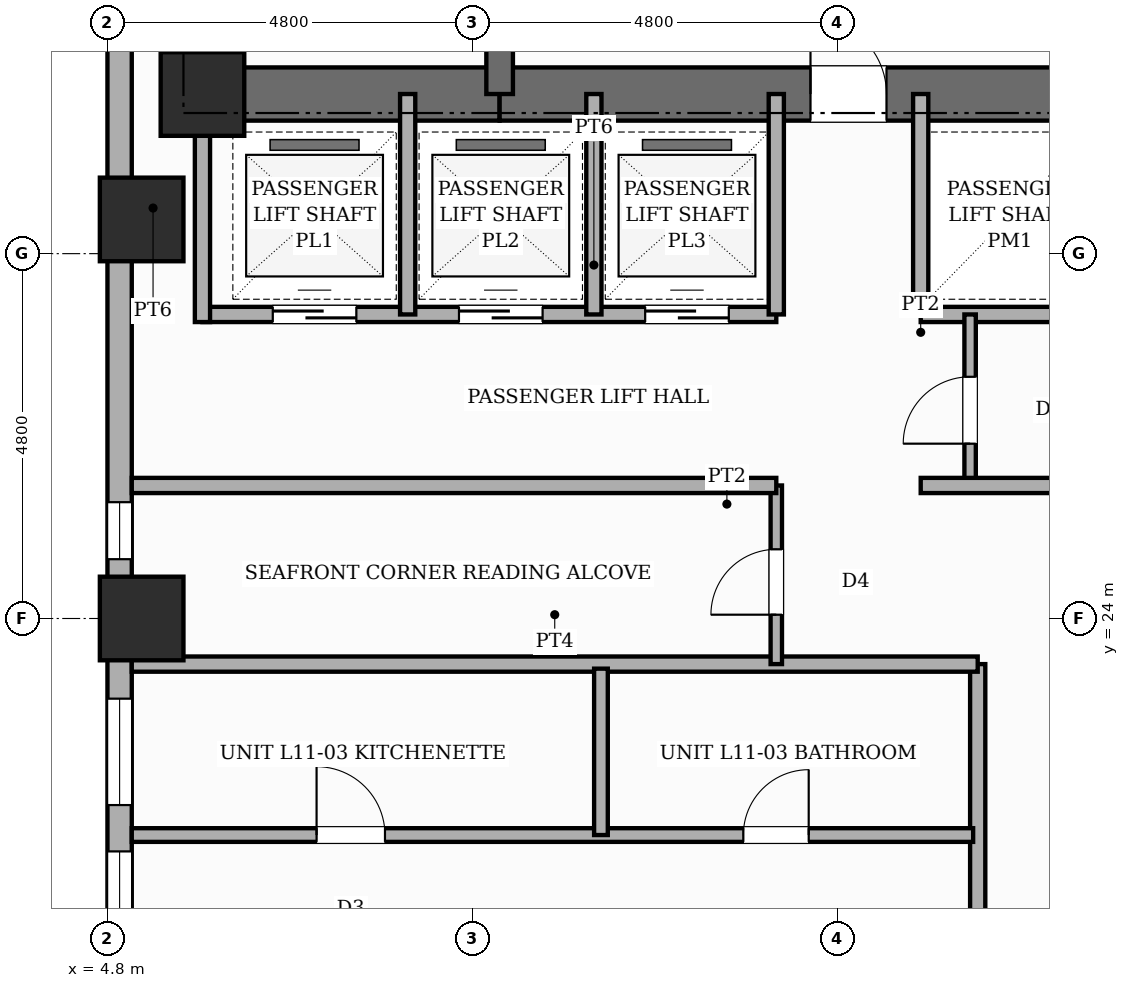
"""IFC4 building model, lengths in metres.
Left out: names, types, materials, properties, quantities, classifications, styles, units other than length and angle.
Written with IfcOpenShell. Run it as: python <this file> out.ifc"""

import sys

from ifc_helpers import new_model, si_unit, direction, frame, frame_2d, origin, origin_2d, place, context, subcontext, project, spatial, rectangle, extrude, element, fill, save


model = new_model("IFC4")
c1 = context("Model", 3, precision=1e-05, world=origin(), true_north=direction((0.0, 1.0)))
c2 = subcontext(c1, "Body", "Model", "MODEL_VIEW")
j1 = project(units=[si_unit("LENGTHUNIT", "METRE"), si_unit("PLANEANGLEUNIT", "RADIAN")], contexts=[c1])
p1 = place(None, origin())
s1 = spatial("IfcSite", under=j1, at=p1, CompositionType="ELEMENT")
p2 = place(p1, origin())
s2 = spatial("IfcBuilding", under=s1, at=p2, CompositionType="ELEMENT")
p3 = place(p2, frame((0.0, 0.0, 46.6)))
s3 = spatial("IfcBuildingStorey", under=s2, at=p3, CompositionType="ELEMENT", Elevation=46.6)
p4 = place(p3, frame((6.05, 30.55, 0.0), z_axis=(0.0, 0.0, 1.0), x_axis=(0.0, 1.0, 0.0)))
e1 = element("IfcWall", 1, at=p4, inside=s3, PredefinedType="SHEAR", context=c2, shape_type="SweptSolid", body=[
    extrude(rectangle(XDim=15.6, YDim=0.7, at=frame_2d((7.8, 0.0))), origin(), (0.0, 0.0, 1.0), 3.6),
])
p5 = place(p3, frame((6.05, 30.9, 0.0), z_axis=(0.0, 0.0, 1.0), x_axis=(1.0, 0.0, 0.0)))
e2 = element("IfcWall", 2, at=p5, inside=s3, PredefinedType="SHEAR", context=c2, shape_type="SweptSolid", body=[
    extrude(rectangle(XDim=3.91, YDim=0.7, at=frame_2d((1.955, 0.0))), origin(), (0.0, 0.0, 1.0), 3.6),
])
p6 = place(p3, frame((9.96, 30.9, 0.0), z_axis=(0.0, 0.0, 1.0), x_axis=(1.0, 0.0, 0.0)))
e3 = element("IfcWall", 3, at=p6, inside=s3, PredefinedType="SHEAR", context=c2, shape_type="SweptSolid", body=[
    extrude(rectangle(XDim=8.88, YDim=0.7, at=frame_2d((4.44, 0.0))), origin(), (0.0, 0.0, 1.0), 3.6),
])
p7 = place(p6, frame((4.09, 0.0, 0.0)))
e4 = element("IfcOpeningElement", 4, at=p7, cuts=e3, PredefinedType="OPENING", context=c2, shape_type="SweptSolid", body=[
    extrude(rectangle(XDim=1.0, YDim=2.15, at=frame_2d((0.5, 1.075))), frame((0.0, 0.36, 0.0), z_axis=(0.0, -1.0, 0.0), x_axis=(1.0, 0.0, 0.0)), (0.0, 0.0, 1.0), 0.72),
])
p8 = place(p3, frame((9.96, 30.9, 0.0), z_axis=(0.0, 0.0, 1.0), x_axis=(0.0, 1.0, 0.0)))
e5 = element("IfcWall", 5, at=p8, inside=s3, PredefinedType="SHEAR", context=c2, shape_type="SweptSolid", body=[
    extrude(rectangle(XDim=14.9, YDim=0.35, at=frame_2d((7.45, 0.0))), origin(), (0.0, 0.0, 1.0), 3.6),
])
p9 = place(p8, frame((0.65, 0.0, 0.0)))
e6 = element("IfcOpeningElement", 6, at=p9, cuts=e5, PredefinedType="OPENING", context=c2, shape_type="SweptSolid", body=[
    extrude(rectangle(XDim=0.95, YDim=2.1, at=frame_2d((0.475, 1.05))), frame((0.0, 0.185, 0.0), z_axis=(0.0, -1.0, 0.0), x_axis=(1.0, 0.0, 0.0)), (0.0, 0.0, 1.0), 0.37),
])
p10 = place(p8, frame((10.45, 0.0, 0.0)))
e7 = element("IfcOpeningElement", 7, at=p10, cuts=e5, PredefinedType="OPENING", context=c2, shape_type="SweptSolid", body=[
    extrude(rectangle(XDim=1.0, YDim=2.15, at=frame_2d((0.5, 1.075))), frame((0.0, 0.185, 0.0), z_axis=(0.0, -1.0, 0.0), x_axis=(1.0, 0.0, 0.0)), (0.0, 0.0, 1.0), 0.37),
])
for number, where, z_axis, x_axis in (
    (8, (5.25, 24.0, 0.0), (0.0, 0.0, 1.0), (1.0, 0.0, 0.0)),
    (9, (5.25, 29.25, 0.0), (0.0, 0.0, 1.0), (1.0, 0.0, 0.0)),
    (10, (6.05, 30.9, 0.0), (0.0, 0.0, 1.0), (1.0, 0.0, 0.0)),
):
    element("IfcColumn", number, at=place(p3, frame(where, z_axis=z_axis, x_axis=x_axis)), inside=s3, PredefinedType="COLUMN", context=c2, shape_type="SweptSolid", body=[
        extrude(rectangle(XDim=1.1, YDim=1.1, at=origin_2d()), origin(), (0.0, 0.0, 1.0), 3.6),
    ])
p11 = place(p3, frame((4.96, 7.2, 0.0), z_axis=(0.0, 0.0, 1.0), x_axis=(0.0, 1.0, 0.0)))
e11 = element("IfcWall", 11, at=p11, inside=s3, PredefinedType="STANDARD", context=c2, shape_type="SweptSolid", body=[
    extrude(rectangle(XDim=38.4, YDim=0.32, at=frame_2d((19.2, 0.0))), origin(), (0.0, 0.0, 1.0), 2.53),
])
p12 = place(p11, frame((9.3, 0.0, 0.0)))
e12 = element("IfcOpeningElement", 12, at=p12, cuts=e11, PredefinedType="OPENING", context=c2, shape_type="SweptSolid", body=[
    extrude(rectangle(XDim=1.1, YDim=2.15, at=frame_2d((0.55, 1.075))), frame((0.0, 0.17, 0.0), z_axis=(0.0, -1.0, 0.0), x_axis=(1.0, 0.0, 0.0)), (0.0, 0.0, 1.0), 0.34),
])
p13 = place(p11, frame((3.97, 0.0, 0.65)))
e13 = element("IfcOpeningElement", 13, at=p13, cuts=e11, PredefinedType="OPENING", context=c2, shape_type="SweptSolid", body=[
    extrude(rectangle(XDim=1.4, YDim=1.1, at=frame_2d((0.7, 0.55))), frame((0.0, 0.17, 0.0), z_axis=(0.0, -1.0, 0.0), x_axis=(1.0, 0.0, 0.0)), (0.0, 0.0, 1.0), 0.34),
])
p14 = place(p11, frame((12.785, 0.0, 0.45)))
e14 = element("IfcOpeningElement", 14, at=p14, cuts=e11, PredefinedType="OPENING", context=c2, shape_type="SweptSolid", body=[
    extrude(rectangle(XDim=0.95, YDim=1.8, at=frame_2d((0.475, 0.9))), frame((0.0, 0.17, 0.0), z_axis=(0.0, -1.0, 0.0), x_axis=(1.0, 0.0, 0.0)), (0.0, 0.0, 1.0), 0.34),
])
p15 = place(p11, frame((0.652, 0.0, 0.45)))
e15 = element("IfcOpeningElement", 15, at=p15, cuts=e11, PredefinedType="OPENING", context=c2, shape_type="SweptSolid", body=[
    extrude(rectangle(XDim=0.95, YDim=1.8, at=frame_2d((0.475, 0.9))), frame((0.0, 0.17, 0.0), z_axis=(0.0, -1.0, 0.0), x_axis=(1.0, 0.0, 0.0)), (0.0, 0.0, 1.0), 0.34),
])
p16 = place(p11, frame((8.01, 0.0, 0.45)))
e16 = element("IfcOpeningElement", 16, at=p16, cuts=e11, PredefinedType="OPENING", context=c2, shape_type="SweptSolid", body=[
    extrude(rectangle(XDim=0.75, YDim=1.8, at=frame_2d((0.375, 0.9))), frame((0.0, 0.17, 0.0), z_axis=(0.0, -1.0, 0.0), x_axis=(1.0, 0.0, 0.0)), (0.0, 0.0, 1.0), 0.34),
])
p17 = place(p11, frame((14.345, 0.0, 0.65)))
e17 = element("IfcOpeningElement", 17, at=p17, cuts=e11, PredefinedType="OPENING", context=c2, shape_type="SweptSolid", body=[
    extrude(rectangle(XDim=1.4, YDim=1.1, at=frame_2d((0.7, 0.55))), frame((0.0, 0.17, 0.0), z_axis=(0.0, -1.0, 0.0), x_axis=(1.0, 0.0, 0.0)), (0.0, 0.0, 1.0), 0.34),
])
p18 = place(p11, frame((17.58, 0.0, 0.45)))
e18 = element("IfcOpeningElement", 18, at=p18, cuts=e11, PredefinedType="OPENING", context=c2, shape_type="SweptSolid", body=[
    extrude(rectangle(XDim=0.75, YDim=1.8, at=frame_2d((0.375, 0.9))), frame((0.0, 0.17, 0.0), z_axis=(0.0, -1.0, 0.0), x_axis=(1.0, 0.0, 0.0)), (0.0, 0.0, 1.0), 0.34),
])
p19 = place(p3, frame((6.05, 28.0, 0.0), z_axis=(0.0, 0.0, 1.0), x_axis=(1.0, 0.0, 0.0)))
e19 = element("IfcWall", 19, at=p19, inside=s3, PredefinedType="POLYGONAL", context=c2, shape_type="SweptSolid", body=[
    extrude(rectangle(XDim=7.55, YDim=0.2, at=frame_2d((3.775, 0.0))), origin(), (0.0, 0.0, 1.0), 3.35),
])
p20 = place(p19, frame((0.925, 0.0, 0.0)))
e20 = element("IfcOpeningElement", 20, at=p20, cuts=e19, PredefinedType="OPENING", context=c2, shape_type="SweptSolid", body=[
    extrude(rectangle(XDim=1.1, YDim=2.15, at=frame_2d((0.55, 1.075))), frame((0.0, 0.11, 0.0), z_axis=(0.0, -1.0, 0.0), x_axis=(1.0, 0.0, 0.0)), (0.0, 0.0, 1.0), 0.22),
])
p21 = place(p19, frame((3.375, 0.0, 0.0)))
e21 = element("IfcOpeningElement", 21, at=p21, cuts=e19, PredefinedType="OPENING", context=c2, shape_type="SweptSolid", body=[
    extrude(rectangle(XDim=1.1, YDim=2.15, at=frame_2d((0.55, 1.075))), frame((0.0, 0.11, 0.0), z_axis=(0.0, -1.0, 0.0), x_axis=(1.0, 0.0, 0.0)), (0.0, 0.0, 1.0), 0.22),
])
p22 = place(p19, frame((5.825, 0.0, 0.0)))
e22 = element("IfcOpeningElement", 22, at=p22, cuts=e19, PredefinedType="OPENING", context=c2, shape_type="SweptSolid", body=[
    extrude(rectangle(XDim=1.1, YDim=2.15, at=frame_2d((0.55, 1.075))), frame((0.0, 0.11, 0.0), z_axis=(0.0, -1.0, 0.0), x_axis=(1.0, 0.0, 0.0)), (0.0, 0.0, 1.0), 0.22),
])
p23 = place(p3, frame((15.5, 28.0, 0.0), z_axis=(0.0, 0.0, 1.0), x_axis=(1.0, 0.0, 0.0)))
e23 = element("IfcWall", 23, at=p23, inside=s3, PredefinedType="POLYGONAL", context=c2, shape_type="SweptSolid", body=[
    extrude(rectangle(XDim=7.25, YDim=0.2, at=frame_2d((3.625, 0.0))), origin(), (0.0, 0.0, 1.0), 3.35),
])
p24 = place(p3, frame((6.05, 27.9, 0.0), z_axis=(0.0, 0.0, 1.0), x_axis=(0.0, 1.0, 0.0)))
e24 = element("IfcWall", 24, at=p24, inside=s3, PredefinedType="POLYGONAL", context=c2, shape_type="SweptSolid", body=[
    extrude(rectangle(XDim=3.0, YDim=0.2, at=frame_2d((1.5, 0.0))), origin(), (0.0, 0.0, 1.0), 3.35),
])
for number, where, z_axis, x_axis in (
    (25, (13.6, 28.0, 0.0), (0.0, 0.0, 1.0), (0.0, 1.0, 0.0)),
    (26, (15.5, 28.0, 0.0), (0.0, 0.0, 1.0), (0.0, 1.0, 0.0)),
    (27, (8.75, 28.0, 0.0), (0.0, 0.0, 1.0), (0.0, 1.0, 0.0)),
    (28, (11.2, 28.0, 0.0), (0.0, 0.0, 1.0), (0.0, 1.0, 0.0)),
):
    element("IfcWall", number, at=place(p3, frame(where, z_axis=z_axis, x_axis=x_axis)), inside=s3, PredefinedType="POLYGONAL", context=c2, shape_type="SweptSolid", body=[
        extrude(rectangle(XDim=2.9, YDim=0.2, at=frame_2d((1.45, 0.0))), origin(), (0.0, 0.0, 1.0), 3.35),
    ])
p25 = place(p3, frame((16.15, 25.75, 0.0), z_axis=(0.0, 0.0, 1.0), x_axis=(0.0, 1.0, 0.0)))
e29 = element("IfcWall", 29, at=p25, inside=s3, PredefinedType="PARTITIONING", context=c2, shape_type="SweptSolid", body=[
    extrude(rectangle(XDim=2.25, YDim=0.15, at=frame_2d((1.125, 0.0))), origin(), (0.0, 0.0, 1.0), 3.35),
])
p26 = place(p25, frame((0.55, 0.0, 0.0)))
e30 = element("IfcOpeningElement", 30, at=p26, cuts=e29, PredefinedType="OPENING", context=c2, shape_type="SweptSolid", body=[
    extrude(rectangle(XDim=0.88, YDim=2.1, at=frame_2d((0.44, 1.05))), frame((0.0, 0.085, 0.0), z_axis=(0.0, -1.0, 0.0), x_axis=(1.0, 0.0, 0.0)), (0.0, 0.0, 1.0), 0.17),
])
p27 = place(p3, frame((16.25, 5.12, 0.0), z_axis=(0.0, 0.0, 1.0), x_axis=(0.0, 1.0, 0.0)))
e31 = element("IfcWall", 31, at=p27, inside=s3, PredefinedType="PARTITIONING", context=c2, shape_type="SweptSolid", body=[
    extrude(rectangle(XDim=18.28, YDim=0.2, at=frame_2d((9.14, 0.0))), origin(), (0.0, 0.0, 1.0), 3.35),
])
p28 = place(p27, frame((1.042, 0.0, 0.0)))
e32 = element("IfcOpeningElement", 32, at=p28, cuts=e31, PredefinedType="OPENING", context=c2, shape_type="SweptSolid", body=[
    extrude(rectangle(XDim=0.98, YDim=2.18, at=frame_2d((0.49, 1.09))), frame((0.0, 0.11, 0.0), z_axis=(0.0, -1.0, 0.0), x_axis=(1.0, 0.0, 0.0)), (0.0, 0.0, 1.0), 0.22),
])
p29 = place(p27, frame((6.28, 0.0, 0.0)))
e33 = element("IfcOpeningElement", 33, at=p29, cuts=e31, PredefinedType="OPENING", context=c2, shape_type="SweptSolid", body=[
    extrude(rectangle(XDim=0.98, YDim=2.18, at=frame_2d((0.49, 1.09))), frame((0.0, 0.11, 0.0), z_axis=(0.0, -1.0, 0.0), x_axis=(1.0, 0.0, 0.0)), (0.0, 0.0, 1.0), 0.22),
])
p30 = place(p27, frame((13.04, 0.0, 0.0)))
e34 = element("IfcOpeningElement", 34, at=p30, cuts=e31, PredefinedType="OPENING", context=c2, shape_type="SweptSolid", body=[
    extrude(rectangle(XDim=0.98, YDim=2.18, at=frame_2d((0.49, 1.09))), frame((0.0, 0.11, 0.0), z_axis=(0.0, -1.0, 0.0), x_axis=(1.0, 0.0, 0.0)), (0.0, 0.0, 1.0), 0.22),
])
p31 = place(p3, frame((5.12, 23.4, 0.0), z_axis=(0.0, 0.0, 1.0), x_axis=(1.0, 0.0, 0.0)))
e35 = element("IfcWall", 35, at=p31, inside=s3, PredefinedType="PARTITIONING", context=c2, shape_type="SweptSolid", body=[
    extrude(rectangle(XDim=11.13, YDim=0.2, at=frame_2d((5.565, 0.0))), origin(), (0.0, 0.0, 1.0), 3.35),
])
p32 = place(p3, frame((15.5, 25.75, 0.0), z_axis=(0.0, 0.0, 1.0), x_axis=(1.0, 0.0, 0.0)))
e36 = element("IfcWall", 36, at=p32, inside=s3, PredefinedType="PARTITIONING", context=c2, shape_type="SweptSolid", body=[
    extrude(rectangle(XDim=8.18, YDim=0.2, at=frame_2d((4.09, 0.0))), origin(), (0.0, 0.0, 1.0), 3.35),
])
p33 = place(p3, frame((13.6, 23.4, 0.0), z_axis=(0.0, 0.0, 1.0), x_axis=(0.0, 1.0, 0.0)))
e37 = element("IfcWall", 37, at=p33, inside=s3, PredefinedType="PARTITIONING", context=c2, shape_type="SweptSolid", body=[
    extrude(rectangle(XDim=2.35, YDim=0.15, at=frame_2d((1.175, 0.0))), origin(), (0.0, 0.0, 1.0), 3.35),
])
p34 = place(p33, frame((0.65, 0.0, 0.0)))
e38 = element("IfcOpeningElement", 38, at=p34, cuts=e37, PredefinedType="OPENING", context=c2, shape_type="SweptSolid", body=[
    extrude(rectangle(XDim=0.86, YDim=2.1, at=frame_2d((0.43, 1.05))), frame((0.0, 0.085, 0.0), z_axis=(0.0, -1.0, 0.0), x_axis=(1.0, 0.0, 0.0)), (0.0, 0.0, 1.0), 0.17),
])
p35 = place(p3, frame((5.12, 25.75, 0.0), z_axis=(0.0, 0.0, 1.0), x_axis=(1.0, 0.0, 0.0)))
e39 = element("IfcWall", 39, at=p35, inside=s3, PredefinedType="PARTITIONING", context=c2, shape_type="SweptSolid", body=[
    extrude(rectangle(XDim=8.48, YDim=0.2, at=frame_2d((4.24, 0.0))), origin(), (0.0, 0.0, 1.0), 3.35),
])
p36 = place(p3, frame((5.12, 21.151, 0.0), z_axis=(0.0, 0.0, 1.0), x_axis=(1.0, 0.0, 0.0)))
e40 = element("IfcWall", 40, at=p36, inside=s3, PredefinedType="PLUMBINGWALL", context=c2, shape_type="SweptSolid", body=[
    extrude(rectangle(XDim=11.07, YDim=0.18, at=frame_2d((5.535, 0.0))), origin(), (0.0, 0.0, 1.0), 3.35),
])
p37 = place(p36, frame((2.431, 0.0, 0.0)))
e41 = element("IfcOpeningElement", 41, at=p37, cuts=e40, PredefinedType="OPENING", context=c2, shape_type="SweptSolid", body=[
    extrude(rectangle(XDim=0.9, YDim=2.15, at=frame_2d((0.45, 1.075))), frame((0.0, 0.1, 0.0), z_axis=(0.0, -1.0, 0.0), x_axis=(1.0, 0.0, 0.0)), (0.0, 0.0, 1.0), 0.2),
])
p38 = place(p36, frame((8.046, 0.0, 0.0)))
e42 = element("IfcOpeningElement", 42, at=p38, cuts=e40, PredefinedType="OPENING", context=c2, shape_type="SweptSolid", body=[
    extrude(rectangle(XDim=0.86, YDim=2.1, at=frame_2d((0.43, 1.05))), frame((0.0, 0.1, 0.0), z_axis=(0.0, -1.0, 0.0), x_axis=(1.0, 0.0, 0.0)), (0.0, 0.0, 1.0), 0.2),
])
p39 = place(p3, frame((11.293, 21.151, 0.0), z_axis=(0.0, 0.0, 1.0), x_axis=(0.0, 1.0, 0.0)))
e43 = element("IfcWall", 43, at=p39, inside=s3, PredefinedType="PLUMBINGWALL", context=c2, shape_type="SweptSolid", body=[
    extrude(rectangle(XDim=2.189, YDim=0.18, at=frame_2d((1.095, 0.0))), origin(), (0.0, 0.0, 1.0), 3.35),
])
p40 = place(p14, origin())
e44 = element("IfcWindow", 44, at=p40, inside=s3, PartitioningType="SINGLE_PANEL", PredefinedType="WINDOW", context=c2, shape_type="SweptSolid", body=[
    extrude(rectangle(XDim=0.95, YDim=1.8, at=frame_2d((0.475, 0.9))), frame((0.0, 0.03, 0.0), z_axis=(0.0, -1.0, 0.0), x_axis=(1.0, 0.0, 0.0)), (0.0, 0.0, 1.0), 0.06),
])
fill(e14, e44)
p41 = place(p17, origin())
e45 = element("IfcWindow", 45, at=p41, inside=s3, PartitioningType="SINGLE_PANEL", PredefinedType="WINDOW", context=c2, shape_type="SweptSolid", body=[
    extrude(rectangle(XDim=1.4, YDim=1.1, at=frame_2d((0.7, 0.55))), frame((0.0, 0.03, 0.0), z_axis=(0.0, -1.0, 0.0), x_axis=(1.0, 0.0, 0.0)), (0.0, 0.0, 1.0), 0.06),
])
fill(e17, e45)
p42 = place(p18, origin())
e46 = element("IfcWindow", 46, at=p42, inside=s3, PartitioningType="SINGLE_PANEL", PredefinedType="WINDOW", context=c2, shape_type="SweptSolid", body=[
    extrude(rectangle(XDim=0.75, YDim=1.8, at=frame_2d((0.375, 0.9))), frame((0.0, 0.03, 0.0), z_axis=(0.0, -1.0, 0.0), x_axis=(1.0, 0.0, 0.0)), (0.0, 0.0, 1.0), 0.06),
])
fill(e18, e46)
p43 = place(p7, origin())
e47 = element("IfcDoor", 47, at=p43, inside=s3, OperationType="SINGLE_SWING_LEFT", PredefinedType="DOOR", context=c2, shape_type="SweptSolid", body=[
    extrude(rectangle(XDim=1.0, YDim=2.15, at=frame_2d((0.5, 1.075))), frame((0.0, 0.025, 0.0), z_axis=(0.0, -1.0, 0.0), x_axis=(1.0, 0.0, 0.0)), (0.0, 0.0, 1.0), 0.05),
])
fill(e4, e47)
p44 = place(p20, origin())
e48 = element("IfcDoor", 48, at=p44, inside=s3, OperationType="SLIDING_TO_LEFT", PredefinedType="DOOR", context=c2, shape_type="SweptSolid", body=[
    extrude(rectangle(XDim=1.1, YDim=2.15, at=frame_2d((0.55, 1.075))), frame((0.0, 0.025, 0.0), z_axis=(0.0, -1.0, 0.0), x_axis=(1.0, 0.0, 0.0)), (0.0, 0.0, 1.0), 0.05),
])
fill(e20, e48)
p45 = place(p21, origin())
e49 = element("IfcDoor", 49, at=p45, inside=s3, OperationType="SLIDING_TO_RIGHT", PredefinedType="DOOR", context=c2, shape_type="SweptSolid", body=[
    extrude(rectangle(XDim=1.1, YDim=2.15, at=frame_2d((0.55, 1.075))), frame((0.0, 0.025, 0.0), z_axis=(0.0, -1.0, 0.0), x_axis=(1.0, 0.0, 0.0)), (0.0, 0.0, 1.0), 0.05),
])
fill(e21, e49)
p46 = place(p22, origin())
e50 = element("IfcDoor", 50, at=p46, inside=s3, OperationType="SLIDING_TO_LEFT", PredefinedType="DOOR", context=c2, shape_type="SweptSolid", body=[
    extrude(rectangle(XDim=1.1, YDim=2.15, at=frame_2d((0.55, 1.075))), frame((0.0, 0.025, 0.0), z_axis=(0.0, -1.0, 0.0), x_axis=(1.0, 0.0, 0.0)), (0.0, 0.0, 1.0), 0.05),
])
fill(e22, e50)
p47 = place(p26, origin())
e51 = element("IfcDoor", 51, at=p47, inside=s3, OperationType="SINGLE_SWING_LEFT", PredefinedType="DOOR", context=c2, shape_type="SweptSolid", body=[
    extrude(rectangle(XDim=0.88, YDim=2.1, at=frame_2d((0.44, 1.05))), frame((0.0, 0.025, 0.0), z_axis=(0.0, -1.0, 0.0), x_axis=(1.0, 0.0, 0.0)), (0.0, 0.0, 1.0), 0.05),
])
fill(e30, e51)
p48 = place(p34, origin())
e52 = element("IfcDoor", 52, at=p48, inside=s3, OperationType="SINGLE_SWING_LEFT", PredefinedType="DOOR", context=c2, shape_type="SweptSolid", body=[
    extrude(rectangle(XDim=0.86, YDim=2.1, at=frame_2d((0.43, 1.05))), frame((0.0, 0.025, 0.0), z_axis=(0.0, -1.0, 0.0), x_axis=(1.0, 0.0, 0.0)), (0.0, 0.0, 1.0), 0.05),
])
fill(e38, e52)
p49 = place(p37, origin())
e53 = element("IfcDoor", 53, at=p49, inside=s3, OperationType="SINGLE_SWING_LEFT", PredefinedType="DOOR", context=c2, shape_type="SweptSolid", body=[
    extrude(rectangle(XDim=0.9, YDim=2.15, at=frame_2d((0.45, 1.075))), frame((0.0, 0.025, 0.0), z_axis=(0.0, -1.0, 0.0), x_axis=(1.0, 0.0, 0.0)), (0.0, 0.0, 1.0), 0.05),
])
fill(e41, e53)
p50 = place(p38, origin())
e54 = element("IfcDoor", 54, at=p50, inside=s3, OperationType="SINGLE_SWING_RIGHT", PredefinedType="DOOR", context=c2, shape_type="SweptSolid", body=[
    extrude(rectangle(XDim=0.86, YDim=2.1, at=frame_2d((0.43, 1.05))), frame((0.0, 0.025, 0.0), z_axis=(0.0, -1.0, 0.0), x_axis=(1.0, 0.0, 0.0)), (0.0, 0.0, 1.0), 0.05),
])
fill(e42, e54)
save(model, sys.argv[1])
